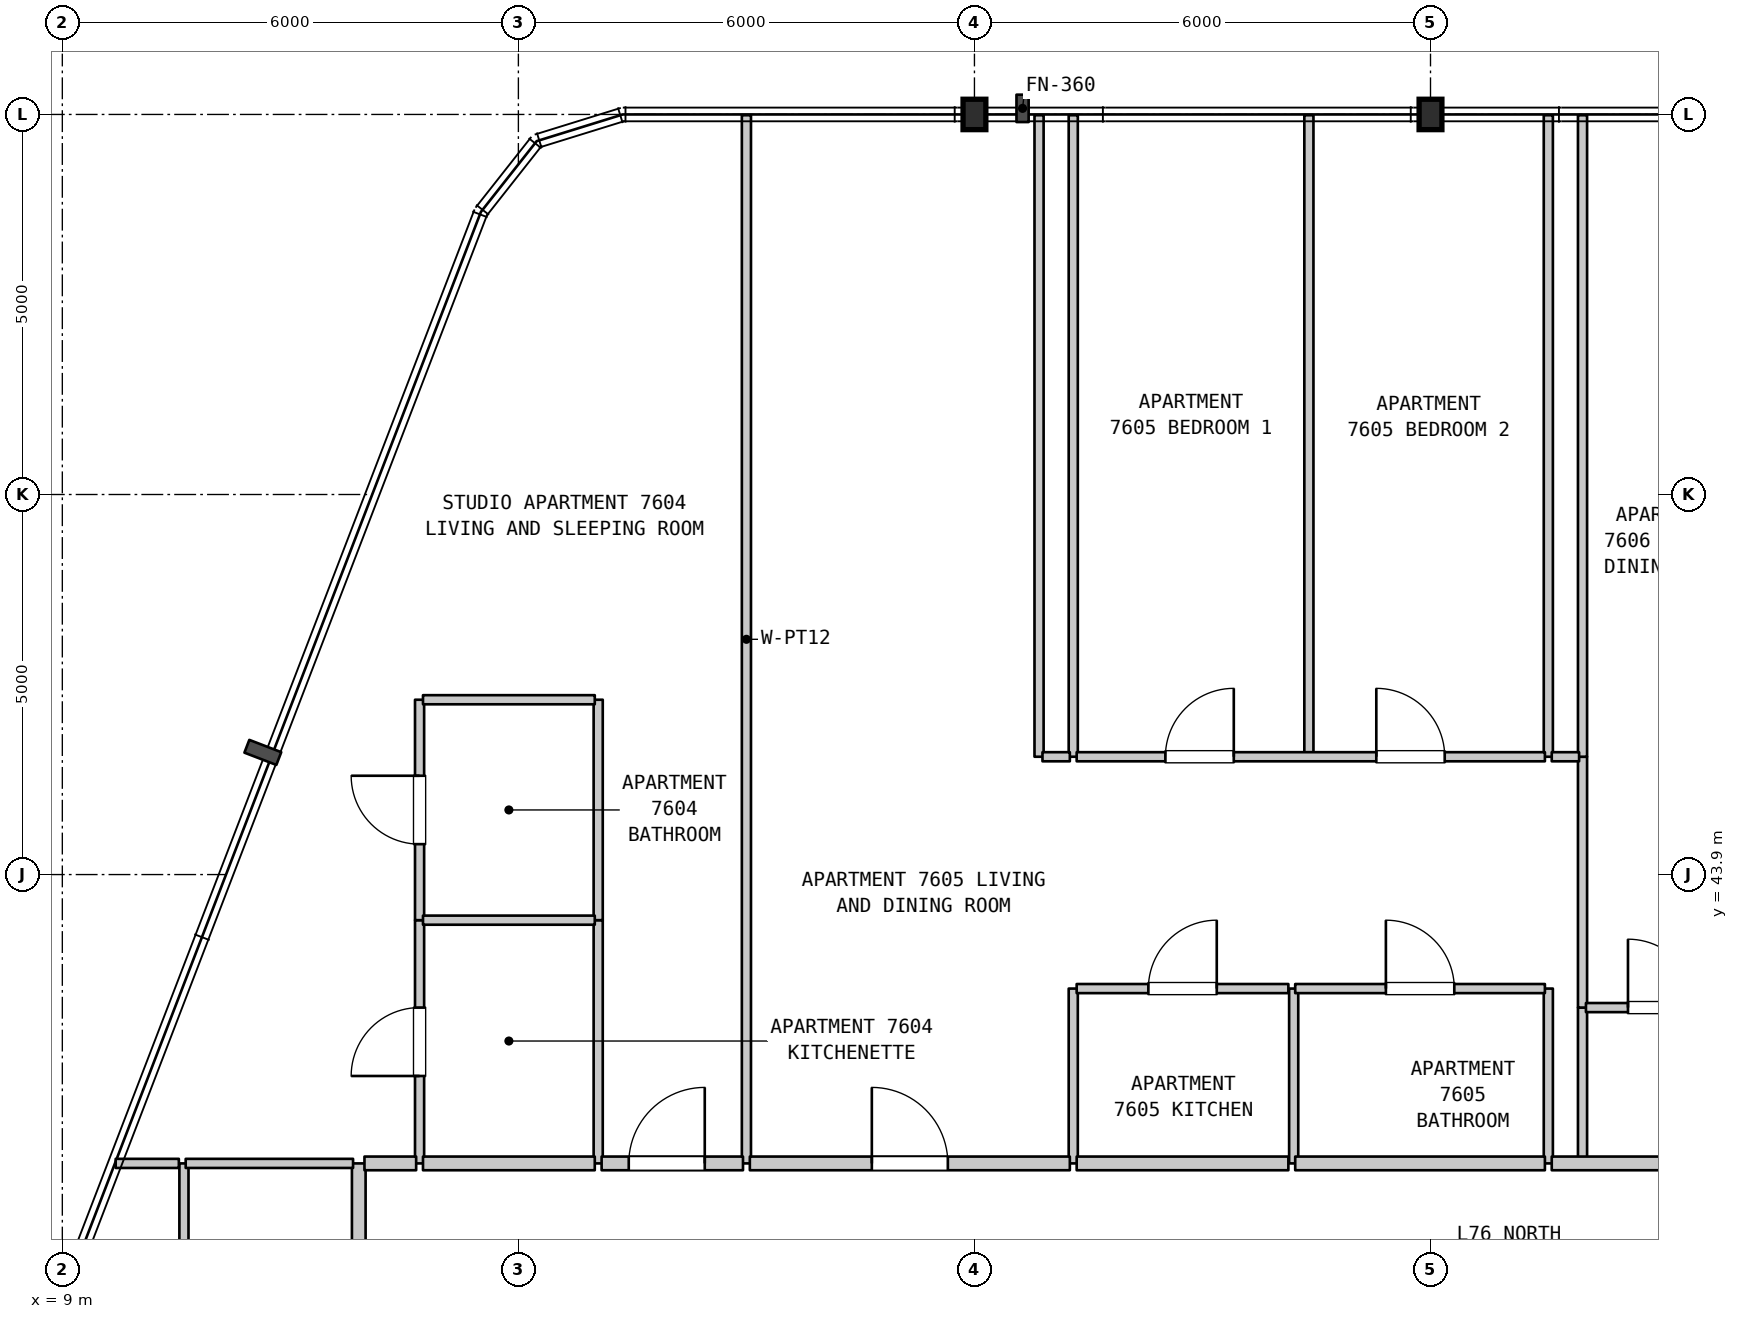
"""IFC4 building model, lengths in metres.
Left out: names, types, materials, properties, quantities, classifications, styles, units other than length and angle.
Written with IfcOpenShell. Run it as: python <this file> out.ifc"""

import sys

from ifc_helpers import new_model, si_unit, direction, frame, frame_2d, origin, origin_2d, place, context, subcontext, project, spatial, rectangle, i_section, extrude, element, fill, save


model = new_model("IFC4")
c1 = context("Model", 3, precision=1e-05, world=origin(), true_north=direction((0.0, 1.0)))
c2 = subcontext(c1, "Body", "Model", "MODEL_VIEW")
j1 = project(units=[si_unit("LENGTHUNIT", "METRE"), si_unit("PLANEANGLEUNIT", "RADIAN")], contexts=[c1])
p1 = place(None, origin())
s1 = spatial("IfcSite", under=j1, at=p1, CompositionType="ELEMENT")
p2 = place(p1, origin())
s2 = spatial("IfcBuilding", under=s1, at=p2, CompositionType="ELEMENT")
p3 = place(p2, frame((0.0, 0.0, 303.6)))
s3 = spatial("IfcBuildingStorey", under=s2, at=p3, CompositionType="ELEMENT", Elevation=303.6)
for number, where, z_axis, x_axis in (
    (1, (21.0, 53.9, 0.0), (0.0, 0.0, 1.0), (1.0, 0.0, 0.0)),
    (2, (27.0, 53.9, 0.0), (0.0, 0.0, 1.0), (1.0, 0.0, 0.0)),
):
    element("IfcColumn", number, at=place(p3, frame(where, z_axis=z_axis, x_axis=x_axis)), inside=s3, PredefinedType="COLUMN", context=c2, shape_type="SweptSolid", body=[
        extrude(i_section(OverallWidth=0.3, OverallDepth=0.4, WebThickness=0.013, FlangeThickness=0.024, FilletRadius=0.027, at=origin_2d()), origin(), (0.0, 0.0, 1.0), 3.7),
    ])
p4 = place(p3, frame((10.6, 31.95, 0.0), z_axis=(0.0, 0.0, 1.0), x_axis=(0.0, 1.0, 0.0)))
e3 = element("IfcWall", 3, at=p4, inside=s3, PredefinedType="PARTITIONING", context=c2, shape_type="SweptSolid", body=[
    extrude(rectangle(XDim=8.15, YDim=0.12, at=frame_2d((4.075, 0.0))), origin(), (0.0, 0.0, 1.0), 3.39),
])
p5 = place(p3, frame((12.9, 31.95, 0.0), z_axis=(0.0, 0.0, 1.0), x_axis=(0.0, 1.0, 0.0)))
e4 = element("IfcWall", 4, at=p5, inside=s3, PredefinedType="STANDARD", context=c2, shape_type="SweptSolid", body=[
    extrude(rectangle(XDim=8.15, YDim=0.18, at=frame_2d((4.075, 0.0))), origin(), (0.0, 0.0, 1.0), 3.39),
])
p6 = place(p3, frame((13.7, 40.1, 0.0), z_axis=(0.0, 0.0, 1.0), x_axis=(0.0, 1.0, 0.0)))
e5 = element("IfcWall", 5, at=p6, inside=s3, PredefinedType="PARTITIONING", context=c2, shape_type="SweptSolid", body=[
    extrude(rectangle(XDim=3.2, YDim=0.12, at=frame_2d((1.6, 0.0))), origin(), (0.0, 0.0, 1.0), 3.39),
])
p7 = place(p6, frame((1.15, 0.0, 0.0)))
e6 = element("IfcOpeningElement", 6, at=p7, cuts=e5, PredefinedType="OPENING", context=c2, shape_type="SweptSolid", body=[
    extrude(rectangle(XDim=0.9, YDim=2.15, at=frame_2d((0.45, 1.075))), frame((0.0, 0.07, 0.0), z_axis=(0.0, -1.0, 0.0), x_axis=(1.0, 0.0, 0.0)), (0.0, 0.0, 1.0), 0.14),
])
p8 = place(p3, frame((13.7, 43.3, 0.0), z_axis=(0.0, 0.0, 1.0), x_axis=(0.0, 1.0, 0.0)))
e7 = element("IfcWall", 7, at=p8, inside=s3, PredefinedType="PARTITIONING", context=c2, shape_type="SweptSolid", body=[
    extrude(rectangle(XDim=2.9, YDim=0.12, at=frame_2d((1.45, 0.0))), origin(), (0.0, 0.0, 1.0), 3.39),
])
p9 = place(p8, frame((1.0, 0.0, 0.0)))
e8 = element("IfcOpeningElement", 8, at=p9, cuts=e7, PredefinedType="OPENING", context=c2, shape_type="SweptSolid", body=[
    extrude(rectangle(XDim=0.9, YDim=2.1, at=frame_2d((0.45, 1.05))), frame((0.0, 0.07, 0.0), z_axis=(0.0, -1.0, 0.0), x_axis=(1.0, 0.0, 0.0)), (0.0, 0.0, 1.0), 0.14),
])
p10 = place(p3, frame((16.05, 40.1, 0.0), z_axis=(0.0, 0.0, 1.0), x_axis=(0.0, 1.0, 0.0)))
e9 = element("IfcWall", 9, at=p10, inside=s3, PredefinedType="PARTITIONING", context=c2, shape_type="SweptSolid", body=[
    extrude(rectangle(XDim=3.2, YDim=0.12, at=frame_2d((1.6, 0.0))), origin(), (0.0, 0.0, 1.0), 3.39),
])
p11 = place(p3, frame((16.05, 43.3, 0.0), z_axis=(0.0, 0.0, 1.0), x_axis=(0.0, 1.0, 0.0)))
e10 = element("IfcWall", 10, at=p11, inside=s3, PredefinedType="PARTITIONING", context=c2, shape_type="SweptSolid", body=[
    extrude(rectangle(XDim=2.9, YDim=0.12, at=frame_2d((1.45, 0.0))), origin(), (0.0, 0.0, 1.0), 3.39),
])
p12 = place(p3, frame((18.0, 40.1, 0.0), z_axis=(0.0, 0.0, 1.0), x_axis=(0.0, 1.0, 0.0)))
e11 = element("IfcWall", 11, at=p12, inside=s3, PredefinedType="PARTITIONING", context=c2, shape_type="SweptSolid", body=[
    extrude(rectangle(XDim=13.79, YDim=0.12, at=frame_2d((6.895, 0.0))), origin(), (0.0, 0.0, 1.0), 3.39),
])
p13 = place(p3, frame((21.85, 45.45, 0.0), z_axis=(0.0, 0.0, 1.0), x_axis=(0.0, 1.0, 0.0)))
e12 = element("IfcWall", 12, at=p13, inside=s3, PredefinedType="PARTITIONING", context=c2, shape_type="SweptSolid", body=[
    extrude(rectangle(XDim=8.44, YDim=0.12, at=frame_2d((4.22, 0.0))), origin(), (0.0, 0.0, 1.0), 3.39),
])
p14 = place(p3, frame((22.3, 40.1, 0.0), z_axis=(0.0, 0.0, 1.0), x_axis=(0.0, 1.0, 0.0)))
e13 = element("IfcWall", 13, at=p14, inside=s3, PredefinedType="PARTITIONING", context=c2, shape_type="SweptSolid", body=[
    extrude(rectangle(XDim=2.3, YDim=0.12, at=frame_2d((1.15, 0.0))), origin(), (0.0, 0.0, 1.0), 3.39),
])
p15 = place(p3, frame((22.3, 45.45, 0.0), z_axis=(0.0, 0.0, 1.0), x_axis=(0.0, 1.0, 0.0)))
e14 = element("IfcWall", 14, at=p15, inside=s3, PredefinedType="PARTITIONING", context=c2, shape_type="SweptSolid", body=[
    extrude(rectangle(XDim=8.44, YDim=0.12, at=frame_2d((4.22, 0.0))), origin(), (0.0, 0.0, 1.0), 3.39),
])
p16 = place(p3, frame((25.2, 40.1, 0.0), z_axis=(0.0, 0.0, 1.0), x_axis=(0.0, 1.0, 0.0)))
e15 = element("IfcWall", 15, at=p16, inside=s3, PredefinedType="PARTITIONING", context=c2, shape_type="SweptSolid", body=[
    extrude(rectangle(XDim=2.3, YDim=0.12, at=frame_2d((1.15, 0.0))), origin(), (0.0, 0.0, 1.0), 3.39),
])
p17 = place(p3, frame((25.4, 45.45, 0.0), z_axis=(0.0, 0.0, 1.0), x_axis=(0.0, 1.0, 0.0)))
e16 = element("IfcWall", 16, at=p17, inside=s3, PredefinedType="PARTITIONING", context=c2, shape_type="SweptSolid", body=[
    extrude(rectangle(XDim=8.44, YDim=0.12, at=frame_2d((4.22, 0.0))), origin(), (0.0, 0.0, 1.0), 3.39),
])
p18 = place(p3, frame((28.55, 40.1, 0.0), z_axis=(0.0, 0.0, 1.0), x_axis=(0.0, 1.0, 0.0)))
e17 = element("IfcWall", 17, at=p18, inside=s3, PredefinedType="PARTITIONING", context=c2, shape_type="SweptSolid", body=[
    extrude(rectangle(XDim=2.3, YDim=0.12, at=frame_2d((1.15, 0.0))), origin(), (0.0, 0.0, 1.0), 3.39),
])
p19 = place(p3, frame((28.55, 45.45, 0.0), z_axis=(0.0, 0.0, 1.0), x_axis=(0.0, 1.0, 0.0)))
e18 = element("IfcWall", 18, at=p19, inside=s3, PredefinedType="PARTITIONING", context=c2, shape_type="SweptSolid", body=[
    extrude(rectangle(XDim=8.44, YDim=0.12, at=frame_2d((4.22, 0.0))), origin(), (0.0, 0.0, 1.0), 3.39),
])
p20 = place(p3, frame((29.0, 40.1, 0.0), z_axis=(0.0, 0.0, 1.0), x_axis=(0.0, 1.0, 0.0)))
e19 = element("IfcWall", 19, at=p20, inside=s3, PredefinedType="PARTITIONING", context=c2, shape_type="SweptSolid", body=[
    extrude(rectangle(XDim=2.05, YDim=0.12, at=frame_2d((1.025, 0.0))), origin(), (0.0, 0.0, 1.0), 3.39),
])
p21 = place(p3, frame((29.0, 42.15, 0.0), z_axis=(0.0, 0.0, 1.0), x_axis=(0.0, 1.0, 0.0)))
e20 = element("IfcWall", 20, at=p21, inside=s3, PredefinedType="PARTITIONING", context=c2, shape_type="SweptSolid", body=[
    extrude(rectangle(XDim=3.3, YDim=0.12, at=frame_2d((1.65, 0.0))), origin(), (0.0, 0.0, 1.0), 3.39),
])
p22 = place(p3, frame((29.0, 45.45, 0.0), z_axis=(0.0, 0.0, 1.0), x_axis=(0.0, 1.0, 0.0)))
e21 = element("IfcWall", 21, at=p22, inside=s3, PredefinedType="PARTITIONING", context=c2, shape_type="SweptSolid", body=[
    extrude(rectangle(XDim=8.44, YDim=0.12, at=frame_2d((4.22, 0.0))), origin(), (0.0, 0.0, 1.0), 3.39),
])
p23 = place(p3, frame((9.702, 40.1, 0.0), z_axis=(0.0, 0.0, 1.0), x_axis=(1.0, 0.0, 0.0)))
e22 = element("IfcWall", 22, at=p23, inside=s3, PredefinedType="PARTITIONING", context=c2, shape_type="SweptSolid", body=[
    extrude(rectangle(XDim=0.831, YDim=0.12, at=frame_2d((0.416, 0.0))), origin(), (0.0, 0.0, 1.0), 3.39),
])
p24 = place(p3, frame((10.623, 40.1, 0.0), z_axis=(0.0, 0.0, 1.0), x_axis=(1.0, 0.0, 0.0)))
e23 = element("IfcWall", 23, at=p24, inside=s3, PredefinedType="PARTITIONING", context=c2, shape_type="SweptSolid", body=[
    extrude(rectangle(XDim=2.202, YDim=0.12, at=frame_2d((1.101, 0.0))), origin(), (0.0, 0.0, 1.0), 3.39),
])
p25 = place(p3, frame((12.975, 40.1, 0.0), z_axis=(0.0, 0.0, 1.0), x_axis=(1.0, 0.0, 0.0)))
e24 = element("IfcWall", 24, at=p25, inside=s3, PredefinedType="STANDARD", context=c2, shape_type="SweptSolid", body=[
    extrude(rectangle(XDim=0.68, YDim=0.18, at=frame_2d((0.34, 0.0))), origin(), (0.0, 0.0, 1.0), 3.39),
])
p26 = place(p3, frame((13.745, 40.1, 0.0), z_axis=(0.0, 0.0, 1.0), x_axis=(1.0, 0.0, 0.0)))
e25 = element("IfcWall", 25, at=p26, inside=s3, PredefinedType="STANDARD", context=c2, shape_type="SweptSolid", body=[
    extrude(rectangle(XDim=2.26, YDim=0.18, at=frame_2d((1.13, 0.0))), origin(), (0.0, 0.0, 1.0), 3.39),
])
p27 = place(p3, frame((16.095, 40.1, 0.0), z_axis=(0.0, 0.0, 1.0), x_axis=(1.0, 0.0, 0.0)))
e26 = element("IfcWall", 26, at=p27, inside=s3, PredefinedType="STANDARD", context=c2, shape_type="SweptSolid", body=[
    extrude(rectangle(XDim=1.86, YDim=0.18, at=frame_2d((0.93, 0.0))), origin(), (0.0, 0.0, 1.0), 3.39),
])
p28 = place(p27, frame((0.357, 0.0, 0.0)))
e27 = element("IfcOpeningElement", 27, at=p28, cuts=e26, PredefinedType="OPENING", context=c2, shape_type="SweptSolid", body=[
    extrude(rectangle(XDim=1.0, YDim=2.15, at=frame_2d((0.5, 1.075))), frame((0.0, 0.1, 0.0), z_axis=(0.0, -1.0, 0.0), x_axis=(1.0, 0.0, 0.0)), (0.0, 0.0, 1.0), 0.2),
])
p29 = place(p3, frame((18.045, 40.1, 0.0), z_axis=(0.0, 0.0, 1.0), x_axis=(1.0, 0.0, 0.0)))
e28 = element("IfcWall", 28, at=p29, inside=s3, PredefinedType="STANDARD", context=c2, shape_type="SweptSolid", body=[
    extrude(rectangle(XDim=4.21, YDim=0.18, at=frame_2d((2.105, 0.0))), origin(), (0.0, 0.0, 1.0), 3.39),
])
p30 = place(p29, frame((1.605, 0.0, 0.0)))
e29 = element("IfcOpeningElement", 29, at=p30, cuts=e28, PredefinedType="OPENING", context=c2, shape_type="SweptSolid", body=[
    extrude(rectangle(XDim=1.0, YDim=2.15, at=frame_2d((0.5, 1.075))), frame((0.0, 0.1, 0.0), z_axis=(0.0, -1.0, 0.0), x_axis=(1.0, 0.0, 0.0)), (0.0, 0.0, 1.0), 0.2),
])
p31 = place(p3, frame((22.345, 40.1, 0.0), z_axis=(0.0, 0.0, 1.0), x_axis=(1.0, 0.0, 0.0)))
e30 = element("IfcWall", 30, at=p31, inside=s3, PredefinedType="STANDARD", context=c2, shape_type="SweptSolid", body=[
    extrude(rectangle(XDim=2.785, YDim=0.18, at=frame_2d((1.393, 0.0))), origin(), (0.0, 0.0, 1.0), 3.39),
])
p32 = place(p3, frame((25.22, 40.1, 0.0), z_axis=(0.0, 0.0, 1.0), x_axis=(1.0, 0.0, 0.0)))
e31 = element("IfcWall", 31, at=p32, inside=s3, PredefinedType="STANDARD", context=c2, shape_type="SweptSolid", body=[
    extrude(rectangle(XDim=3.285, YDim=0.18, at=frame_2d((1.643, 0.0))), origin(), (0.0, 0.0, 1.0), 3.39),
])
p33 = place(p3, frame((28.595, 40.1, 0.0), z_axis=(0.0, 0.0, 1.0), x_axis=(1.0, 0.0, 0.0)))
e32 = element("IfcWall", 32, at=p33, inside=s3, PredefinedType="STANDARD", context=c2, shape_type="SweptSolid", body=[
    extrude(rectangle(XDim=4.33, YDim=0.18, at=frame_2d((2.165, 0.0))), origin(), (0.0, 0.0, 1.0), 3.39),
])
p34 = place(p33, frame((1.88, 0.0, 0.0)))
e33 = element("IfcOpeningElement", 33, at=p34, cuts=e32, PredefinedType="OPENING", context=c2, shape_type="SweptSolid", body=[
    extrude(rectangle(XDim=1.0, YDim=2.15, at=frame_2d((0.5, 1.075))), frame((0.0, 0.1, 0.0), z_axis=(0.0, -1.0, 0.0), x_axis=(1.0, 0.0, 0.0)), (0.0, 0.0, 1.0), 0.2),
])
p35 = place(p3, frame((29.045, 42.15, 0.0), z_axis=(0.0, 0.0, 1.0), x_axis=(1.0, 0.0, 0.0)))
e34 = element("IfcWall", 34, at=p35, inside=s3, PredefinedType="PARTITIONING", context=c2, shape_type="SweptSolid", body=[
    extrude(rectangle(XDim=2.16, YDim=0.12, at=frame_2d((1.08, 0.0))), origin(), (0.0, 0.0, 1.0), 3.39),
])
p36 = place(p35, frame((0.553, 0.0, 0.0)))
e35 = element("IfcOpeningElement", 35, at=p36, cuts=e34, PredefinedType="OPENING", context=c2, shape_type="SweptSolid", body=[
    extrude(rectangle(XDim=0.9, YDim=2.15, at=frame_2d((0.45, 1.075))), frame((0.0, 0.07, 0.0), z_axis=(0.0, -1.0, 0.0), x_axis=(1.0, 0.0, 0.0)), (0.0, 0.0, 1.0), 0.14),
])
p37 = place(p3, frame((22.345, 42.4, 0.0), z_axis=(0.0, 0.0, 1.0), x_axis=(1.0, 0.0, 0.0)))
e36 = element("IfcWall", 36, at=p37, inside=s3, PredefinedType="PARTITIONING", context=c2, shape_type="SweptSolid", body=[
    extrude(rectangle(XDim=2.785, YDim=0.12, at=frame_2d((1.393, 0.0))), origin(), (0.0, 0.0, 1.0), 3.39),
])
p38 = place(p37, frame((0.943, 0.0, 0.0)))
e37 = element("IfcOpeningElement", 37, at=p38, cuts=e36, PredefinedType="OPENING", context=c2, shape_type="SweptSolid", body=[
    extrude(rectangle(XDim=0.9, YDim=2.15, at=frame_2d((0.45, 1.075))), frame((0.0, 0.07, 0.0), z_axis=(0.0, -1.0, 0.0), x_axis=(1.0, 0.0, 0.0)), (0.0, 0.0, 1.0), 0.14),
])
p39 = place(p3, frame((25.22, 42.4, 0.0), z_axis=(0.0, 0.0, 1.0), x_axis=(1.0, 0.0, 0.0)))
e38 = element("IfcWall", 38, at=p39, inside=s3, PredefinedType="PARTITIONING", context=c2, shape_type="SweptSolid", body=[
    extrude(rectangle(XDim=3.285, YDim=0.12, at=frame_2d((1.643, 0.0))), origin(), (0.0, 0.0, 1.0), 3.39),
])
p40 = place(p39, frame((1.193, 0.0, 0.0)))
e39 = element("IfcOpeningElement", 39, at=p40, cuts=e38, PredefinedType="OPENING", context=c2, shape_type="SweptSolid", body=[
    extrude(rectangle(XDim=0.9, YDim=2.1, at=frame_2d((0.45, 1.05))), frame((0.0, 0.07, 0.0), z_axis=(0.0, -1.0, 0.0), x_axis=(1.0, 0.0, 0.0)), (0.0, 0.0, 1.0), 0.14),
])
p41 = place(p3, frame((13.745, 43.3, 0.0), z_axis=(0.0, 0.0, 1.0), x_axis=(1.0, 0.0, 0.0)))
e40 = element("IfcWall", 40, at=p41, inside=s3, PredefinedType="PARTITIONING", context=c2, shape_type="SweptSolid", body=[
    extrude(rectangle(XDim=2.26, YDim=0.12, at=frame_2d((1.13, 0.0))), origin(), (0.0, 0.0, 1.0), 3.39),
])
p42 = place(p3, frame((21.895, 45.45, 0.0), z_axis=(0.0, 0.0, 1.0), x_axis=(1.0, 0.0, 0.0)))
e41 = element("IfcWall", 41, at=p42, inside=s3, PredefinedType="PARTITIONING", context=c2, shape_type="SweptSolid", body=[
    extrude(rectangle(XDim=0.36, YDim=0.12, at=frame_2d((0.18, 0.0))), origin(), (0.0, 0.0, 1.0), 3.39),
])
p43 = place(p3, frame((22.345, 45.45, 0.0), z_axis=(0.0, 0.0, 1.0), x_axis=(1.0, 0.0, 0.0)))
e42 = element("IfcWall", 42, at=p43, inside=s3, PredefinedType="PARTITIONING", context=c2, shape_type="SweptSolid", body=[
    extrude(rectangle(XDim=6.16, YDim=0.12, at=frame_2d((3.08, 0.0))), origin(), (0.0, 0.0, 1.0), 3.39),
])
p44 = place(p43, frame((1.167, 0.0, 0.0)))
e43 = element("IfcOpeningElement", 43, at=p44, cuts=e42, PredefinedType="OPENING", context=c2, shape_type="SweptSolid", body=[
    extrude(rectangle(XDim=0.9, YDim=2.15, at=frame_2d((0.45, 1.075))), frame((0.0, 0.07, 0.0), z_axis=(0.0, -1.0, 0.0), x_axis=(1.0, 0.0, 0.0)), (0.0, 0.0, 1.0), 0.14),
])
p45 = place(p43, frame((3.942, 0.0, 0.0)))
e44 = element("IfcOpeningElement", 44, at=p45, cuts=e42, PredefinedType="OPENING", context=c2, shape_type="SweptSolid", body=[
    extrude(rectangle(XDim=0.9, YDim=2.15, at=frame_2d((0.45, 1.075))), frame((0.0, 0.07, 0.0), z_axis=(0.0, -1.0, 0.0), x_axis=(1.0, 0.0, 0.0)), (0.0, 0.0, 1.0), 0.14),
])
p46 = place(p3, frame((28.595, 45.45, 0.0), z_axis=(0.0, 0.0, 1.0), x_axis=(1.0, 0.0, 0.0)))
e45 = element("IfcWall", 45, at=p46, inside=s3, PredefinedType="PARTITIONING", context=c2, shape_type="SweptSolid", body=[
    extrude(rectangle(XDim=0.36, YDim=0.12, at=frame_2d((0.18, 0.0))), origin(), (0.0, 0.0, 1.0), 3.39),
])
p47 = place(p3, frame((13.745, 46.2, 0.0), z_axis=(0.0, 0.0, 1.0), x_axis=(1.0, 0.0, 0.0)))
e46 = element("IfcWall", 46, at=p47, inside=s3, PredefinedType="PARTITIONING", context=c2, shape_type="SweptSolid", body=[
    extrude(rectangle(XDim=2.26, YDim=0.12, at=frame_2d((1.13, 0.0))), origin(), (0.0, 0.0, 1.0), 3.39),
])
p48 = place(p7, origin())
e47 = element("IfcDoor", 47, at=p48, inside=s3, OperationType="SINGLE_SWING_LEFT", PredefinedType="DOOR", context=c2, shape_type="SweptSolid", body=[
    extrude(rectangle(XDim=0.9, YDim=2.15, at=frame_2d((0.45, 1.075))), frame((0.0, 0.025, 0.0), z_axis=(0.0, -1.0, 0.0), x_axis=(1.0, 0.0, 0.0)), (0.0, 0.0, 1.0), 0.05),
])
fill(e6, e47)
p49 = place(p9, origin())
e48 = element("IfcDoor", 48, at=p49, inside=s3, OperationType="SINGLE_SWING_RIGHT", PredefinedType="DOOR", context=c2, shape_type="SweptSolid", body=[
    extrude(rectangle(XDim=0.9, YDim=2.1, at=frame_2d((0.45, 1.05))), frame((0.0, 0.025, 0.0), z_axis=(0.0, -1.0, 0.0), x_axis=(1.0, 0.0, 0.0)), (0.0, 0.0, 1.0), 0.05),
])
fill(e8, e48)
p50 = place(p28, origin())
e49 = element("IfcDoor", 49, at=p50, inside=s3, OperationType="SINGLE_SWING_RIGHT", PredefinedType="DOOR", context=c2, shape_type="SweptSolid", body=[
    extrude(rectangle(XDim=1.0, YDim=2.15, at=frame_2d((0.5, 1.075))), frame((0.0, 0.025, 0.0), z_axis=(0.0, -1.0, 0.0), x_axis=(1.0, 0.0, 0.0)), (0.0, 0.0, 1.0), 0.05),
])
fill(e27, e49)
p51 = place(p30, origin())
e50 = element("IfcDoor", 50, at=p51, inside=s3, OperationType="SINGLE_SWING_LEFT", PredefinedType="DOOR", context=c2, shape_type="SweptSolid", body=[
    extrude(rectangle(XDim=1.0, YDim=2.15, at=frame_2d((0.5, 1.075))), frame((0.0, 0.025, 0.0), z_axis=(0.0, -1.0, 0.0), x_axis=(1.0, 0.0, 0.0)), (0.0, 0.0, 1.0), 0.05),
])
fill(e29, e50)
p52 = place(p36, origin())
e51 = element("IfcDoor", 51, at=p52, inside=s3, OperationType="SINGLE_SWING_LEFT", PredefinedType="DOOR", context=c2, shape_type="SweptSolid", body=[
    extrude(rectangle(XDim=0.9, YDim=2.15, at=frame_2d((0.45, 1.075))), frame((0.0, 0.025, 0.0), z_axis=(0.0, -1.0, 0.0), x_axis=(1.0, 0.0, 0.0)), (0.0, 0.0, 1.0), 0.05),
])
fill(e35, e51)
p53 = place(p38, origin())
e52 = element("IfcDoor", 52, at=p53, inside=s3, OperationType="SINGLE_SWING_RIGHT", PredefinedType="DOOR", context=c2, shape_type="SweptSolid", body=[
    extrude(rectangle(XDim=0.9, YDim=2.15, at=frame_2d((0.45, 1.075))), frame((0.0, 0.025, 0.0), z_axis=(0.0, -1.0, 0.0), x_axis=(1.0, 0.0, 0.0)), (0.0, 0.0, 1.0), 0.05),
])
fill(e37, e52)
p54 = place(p40, origin())
e53 = element("IfcDoor", 53, at=p54, inside=s3, OperationType="SINGLE_SWING_LEFT", PredefinedType="DOOR", context=c2, shape_type="SweptSolid", body=[
    extrude(rectangle(XDim=0.9, YDim=2.1, at=frame_2d((0.45, 1.05))), frame((0.0, 0.025, 0.0), z_axis=(0.0, -1.0, 0.0), x_axis=(1.0, 0.0, 0.0)), (0.0, 0.0, 1.0), 0.05),
])
fill(e39, e53)
p55 = place(p44, origin())
e54 = element("IfcDoor", 54, at=p55, inside=s3, OperationType="SINGLE_SWING_RIGHT", PredefinedType="DOOR", context=c2, shape_type="SweptSolid", body=[
    extrude(rectangle(XDim=0.9, YDim=2.15, at=frame_2d((0.45, 1.075))), frame((0.0, 0.025, 0.0), z_axis=(0.0, -1.0, 0.0), x_axis=(1.0, 0.0, 0.0)), (0.0, 0.0, 1.0), 0.05),
])
fill(e43, e54)
p56 = place(p45, origin())
e55 = element("IfcDoor", 55, at=p56, inside=s3, OperationType="SINGLE_SWING_LEFT", PredefinedType="DOOR", context=c2, shape_type="SweptSolid", body=[
    extrude(rectangle(XDim=0.9, YDim=2.15, at=frame_2d((0.45, 1.075))), frame((0.0, 0.025, 0.0), z_axis=(0.0, -1.0, 0.0), x_axis=(1.0, 0.0, 0.0)), (0.0, 0.0, 1.0), 0.05),
])
fill(e44, e55)
save(model, sys.argv[1])
